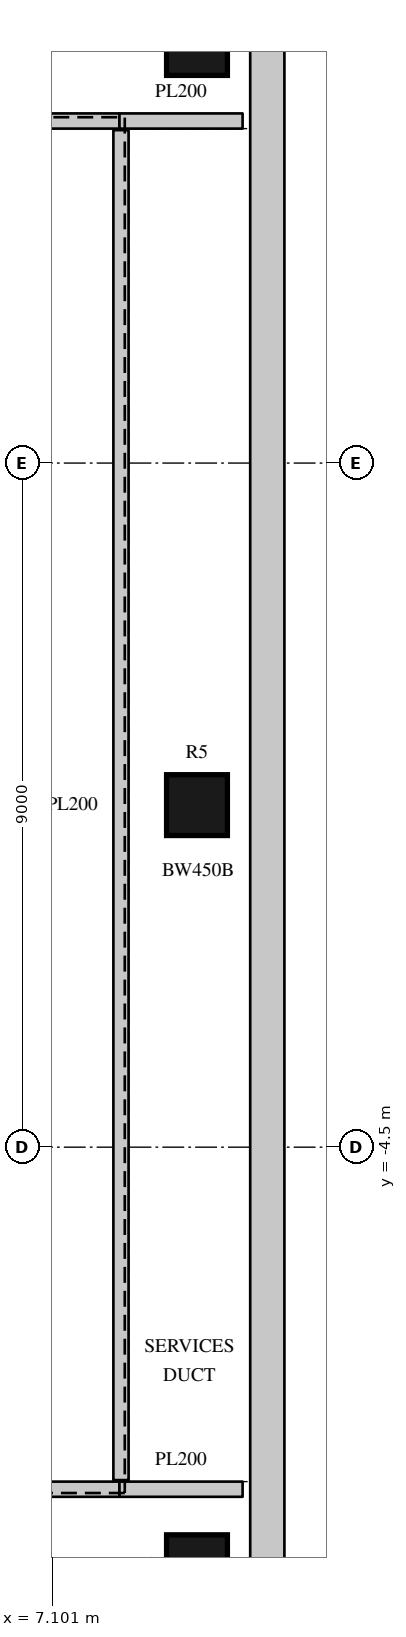
"""IFC4 building model, lengths in metres.
Left out: names, types, materials, properties, quantities, classifications, styles, units other than length and angle.
Written with IfcOpenShell. Run it as: python <this file> out.ifc"""

import sys

from ifc_helpers import new_model, si_unit, direction, frame, frame_2d, origin, origin_2d, place, context, subcontext, project, spatial, rectangle, circle, extrude, element, save


model = new_model("IFC4")
c1 = context("Model", 3, precision=1e-05, world=origin(), true_north=direction((0.0, 1.0)))
c2 = subcontext(c1, "Body", "Model", "MODEL_VIEW")
j1 = project(units=[si_unit("LENGTHUNIT", "METRE"), si_unit("PLANEANGLEUNIT", "RADIAN")], contexts=[c1])
p1 = place(None, origin())
s1 = spatial("IfcSite", under=j1, at=p1, CompositionType="ELEMENT")
p2 = place(p1, origin())
s2 = spatial("IfcBuilding", under=s1, at=p2, CompositionType="ELEMENT")
p3 = place(p2, frame((0.0, 0.0, 347.0)))
s3 = spatial("IfcBuildingStorey", under=s2, at=p3, CompositionType="ELEMENT", Elevation=347.0)
for number, where, z_axis, x_axis in (
    (1, (9.0, -10.0, 0.0), (0.0, 0.0, 1.0), (1.0, 0.0, 0.0)),
    (2, (9.0, 0.0, 0.0), (0.0, 0.0, 1.0), (1.0, 0.0, 0.0)),
    (3, (9.0, 10.0, 0.0), (0.0, 0.0, 1.0), (1.0, 0.0, 0.0)),
):
    element("IfcColumn", number, at=place(p3, frame(where, z_axis=z_axis, x_axis=x_axis)), inside=s3, PredefinedType="COLUMN", context=c2, shape_type="SweptSolid", body=[
        extrude(circle(Radius=0.4, at=origin_2d()), origin(), (0.0, 0.0, 1.0), 4.0),
    ])
p4 = place(p3, frame((9.925, -12.99, 0.0), z_axis=(0.0, 0.0, 1.0), x_axis=(0.0, 1.0, 0.0)))
e4 = element("IfcWall", 4, at=p4, inside=s3, PredefinedType="SOLIDWALL", context=c2, shape_type="SweptSolid", body=[
    extrude(rectangle(XDim=24.229, YDim=0.45, at=frame_2d((12.115, 0.0))), origin(), (0.0, 0.0, 1.0), 3.7),
])
for number, where, z_axis, x_axis in (
    (5, (-5.98, -9.0, 0.0), (0.0, 0.0, 1.0), (1.0, 0.0, 0.0)),
    (6, (-5.98, 9.0, 0.0), (0.0, 0.0, 1.0), (1.0, 0.0, 0.0)),
):
    element("IfcWall", number, at=place(p3, frame(where, z_axis=z_axis, x_axis=x_axis)), inside=s3, PredefinedType="PARTITIONING", context=c2, shape_type="SweptSolid", body=[
        extrude(rectangle(XDim=13.96, YDim=0.2, at=frame_2d((6.98, 0.0))), origin(), (0.0, 0.0, 1.0), 3.598),
    ])
for number, where, z_axis, x_axis in (
    (7, (7.98, -9.0, 0.0), (0.0, 0.0, 1.0), (1.0, 0.0, 0.0)),
    (8, (7.98, 9.0, 0.0), (0.0, 0.0, 1.0), (1.0, 0.0, 0.0)),
):
    element("IfcWall", number, at=place(p3, frame(where, z_axis=z_axis, x_axis=x_axis)), inside=s3, PredefinedType="PARTITIONING", context=c2, shape_type="SweptSolid", body=[
        extrude(rectangle(XDim=1.62, YDim=0.2, at=frame_2d((0.81, 0.0))), origin(), (0.0, 0.0, 1.0), 3.598),
    ])
p5 = place(p3, frame((8.0, -8.88, 0.0), z_axis=(0.0, 0.0, 1.0), x_axis=(0.0, 1.0, 0.0)))
e9 = element("IfcWall", 9, at=p5, inside=s3, PredefinedType="PARTITIONING", context=c2, shape_type="SweptSolid", body=[
    extrude(rectangle(XDim=17.76, YDim=0.2, at=frame_2d((8.88, 0.0))), origin(), (0.0, 0.0, 1.0), 3.598),
])
save(model, sys.argv[1])
